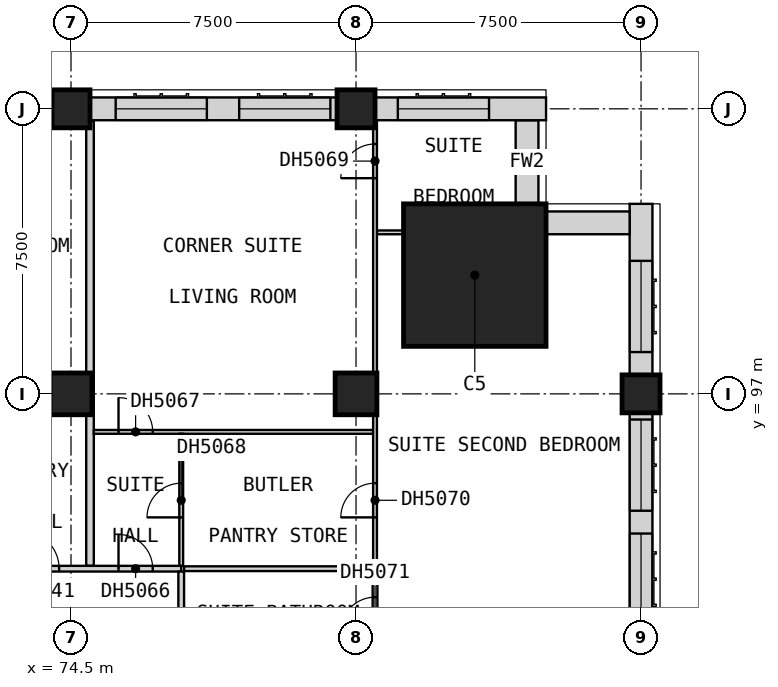
"""IFC4 building model, lengths in metres.
Left out: names, types, materials, properties, quantities, classifications, styles, units other than length and angle.
Written with IfcOpenShell. Run it as: python <this file> out.ifc"""

import sys

from ifc_helpers import new_model, si_unit, direction, frame, frame_2d, origin, origin_2d, place, context, subcontext, project, spatial, rectangle, extrude, element, fill, save


model = new_model("IFC4")
c1 = context("Model", 3, precision=1e-05, world=origin(), true_north=direction((0.0, 1.0)))
c2 = subcontext(c1, "Body", "Model", "MODEL_VIEW")
j1 = project(units=[si_unit("LENGTHUNIT", "METRE"), si_unit("PLANEANGLEUNIT", "RADIAN")], contexts=[c1])
p1 = place(None, origin())
s1 = spatial("IfcSite", under=j1, at=p1, CompositionType="ELEMENT")
p2 = place(p1, origin())
s2 = spatial("IfcBuilding", under=s1, at=p2, CompositionType="ELEMENT")
p3 = place(p2, frame((0.0, 0.0, 93.5)))
s3 = spatial("IfcBuildingStorey", under=s2, at=p3, CompositionType="ELEMENT", Elevation=93.5)
p4 = place(p3, frame((74.5, 97.0, 0.0), z_axis=(0.0, 0.0, 1.0), x_axis=(1.0, 0.0, 0.0)))
e1 = element("IfcColumn", 1, at=p4, inside=s3, PredefinedType="COLUMN", context=c2, shape_type="SweptSolid", body=[
    extrude(rectangle(XDim=1.1, YDim=1.1, at=origin_2d()), origin(), (0.0, 0.0, 1.0), 3.6),
])
p5 = place(p3, frame((74.5, 104.5, 0.0), z_axis=(0.0, 0.0, 1.0), x_axis=(1.0, 0.0, 0.0)))
e2 = element("IfcColumn", 2, at=p5, inside=s3, PredefinedType="COLUMN", context=c2, shape_type="SweptSolid", body=[
    extrude(rectangle(XDim=1.0, YDim=1.0, at=origin_2d()), origin(), (0.0, 0.0, 1.0), 3.6),
])
p6 = place(p3, frame((82.0, 97.0, 0.0), z_axis=(0.0, 0.0, 1.0), x_axis=(1.0, 0.0, 0.0)))
e3 = element("IfcColumn", 3, at=p6, inside=s3, PredefinedType="COLUMN", context=c2, shape_type="SweptSolid", body=[
    extrude(rectangle(XDim=1.1, YDim=1.1, at=origin_2d()), origin(), (0.0, 0.0, 1.0), 3.6),
])
for number, where, z_axis, x_axis in (
    (4, (82.0, 104.5, 0.0), (0.0, 0.0, 1.0), (1.0, 0.0, 0.0)),
    (5, (89.5, 97.0, 0.0), (0.0, 0.0, 1.0), (1.0, 0.0, 0.0)),
):
    element("IfcColumn", number, at=place(p3, frame(where, z_axis=z_axis, x_axis=x_axis)), inside=s3, PredefinedType="COLUMN", context=c2, shape_type="SweptSolid", body=[
        extrude(rectangle(XDim=1.0, YDim=1.0, at=origin_2d()), origin(), (0.0, 0.0, 1.0), 3.6),
    ])
p7 = place(p3, frame((85.125, 100.125, 0.0), z_axis=(0.0, 0.0, 1.0), x_axis=(1.0, 0.0, 0.0)))
e6 = element("IfcColumn", 6, at=p7, inside=s3, PredefinedType="COLUMN", context=c2, shape_type="SweptSolid", body=[
    extrude(rectangle(XDim=3.75, YDim=3.75, at=origin_2d()), origin(), (0.0, 0.0, 1.0), 3.6),
])
p8 = place(p3, frame((89.5, 90.5, 0.0), z_axis=(0.0, 0.0, 1.0), x_axis=(0.0, 1.0, 0.0)))
e7 = element("IfcWall", 7, at=p8, inside=s3, PredefinedType="SOLIDWALL", context=c2, shape_type="SweptSolid", body=[
    extrude(rectangle(XDim=6.0, YDim=0.6, at=frame_2d((3.0, 0.0))), origin(), (0.0, 0.0, 1.0), 2.85),
])
p9 = place(p8, frame((0.425, 0.0, 0.8)))
e8 = element("IfcOpeningElement", 8, at=p9, cuts=e7, PredefinedType="OPENING", context=c2, shape_type="SweptSolid", body=[
    extrude(rectangle(XDim=2.4, YDim=1.8, at=frame_2d((1.2, 0.9))), frame((0.0, 0.31, 0.0), z_axis=(0.0, -1.0, 0.0), x_axis=(1.0, 0.0, 0.0)), (0.0, 0.0, 1.0), 0.62),
])
p10 = place(p8, frame((3.425, 0.0, 0.8)))
e9 = element("IfcOpeningElement", 9, at=p10, cuts=e7, PredefinedType="OPENING", context=c2, shape_type="SweptSolid", body=[
    extrude(rectangle(XDim=2.4, YDim=1.8, at=frame_2d((1.2, 0.9))), frame((0.0, 0.31, 0.0), z_axis=(0.0, -1.0, 0.0), x_axis=(1.0, 0.0, 0.0)), (0.0, 0.0, 1.0), 0.62),
])
p11 = place(p3, frame((89.5, 97.5, 0.0), z_axis=(0.0, 0.0, 1.0), x_axis=(0.0, 1.0, 0.0)))
e10 = element("IfcWall", 10, at=p11, inside=s3, PredefinedType="SOLIDWALL", context=c2, shape_type="SweptSolid", body=[
    extrude(rectangle(XDim=4.5, YDim=0.6, at=frame_2d((2.25, 0.0))), origin(), (0.0, 0.0, 1.0), 2.85),
])
p12 = place(p11, frame((0.6, 0.0, 0.8)))
e11 = element("IfcOpeningElement", 11, at=p12, cuts=e10, PredefinedType="OPENING", context=c2, shape_type="SweptSolid", body=[
    extrude(rectangle(XDim=2.4, YDim=1.8, at=frame_2d((1.2, 0.9))), frame((0.0, 0.31, 0.0), z_axis=(0.0, -1.0, 0.0), x_axis=(1.0, 0.0, 0.0)), (0.0, 0.0, 1.0), 0.62),
])
for number, where, z_axis, x_axis in (
    (12, (89.2, 101.5, 0.0), (0.0, 0.0, 1.0), (-1.0, 0.0, 0.0)),
    (13, (86.5, 102.0, 0.0), (0.0, 0.0, 1.0), (0.0, 1.0, 0.0)),
):
    element("IfcWall", number, at=place(p3, frame(where, z_axis=z_axis, x_axis=x_axis)), inside=s3, PredefinedType="SOLIDWALL", context=c2, shape_type="SweptSolid", body=[
        extrude(rectangle(XDim=2.2, YDim=0.6, at=frame_2d((1.1, 0.0))), origin(), (0.0, 0.0, 1.0), 3.35),
    ])
p13 = place(p3, frame((87.0, 104.5, 0.0), z_axis=(0.0, 0.0, 1.0), x_axis=(-1.0, 0.0, 0.0)))
e14 = element("IfcWall", 14, at=p13, inside=s3, PredefinedType="SOLIDWALL", context=c2, shape_type="SweptSolid", body=[
    extrude(rectangle(XDim=4.5, YDim=0.6, at=frame_2d((2.25, 0.0))), origin(), (0.0, 0.0, 1.0), 2.85),
])
p14 = place(p13, frame((1.5, 0.0, 0.8)))
e15 = element("IfcOpeningElement", 15, at=p14, cuts=e14, PredefinedType="OPENING", context=c2, shape_type="SweptSolid", body=[
    extrude(rectangle(XDim=2.4, YDim=1.8, at=frame_2d((1.2, 0.9))), frame((0.0, 0.31, 0.0), z_axis=(0.0, -1.0, 0.0), x_axis=(1.0, 0.0, 0.0)), (0.0, 0.0, 1.0), 0.62),
])
p15 = place(p3, frame((81.5, 104.5, 0.0), z_axis=(0.0, 0.0, 1.0), x_axis=(-1.0, 0.0, 0.0)))
e16 = element("IfcWall", 16, at=p15, inside=s3, PredefinedType="SOLIDWALL", context=c2, shape_type="SweptSolid", body=[
    extrude(rectangle(XDim=6.5, YDim=0.6, at=frame_2d((3.25, 0.0))), origin(), (0.0, 0.0, 1.0), 2.85),
])
p16 = place(p15, frame((3.425, 0.0, 0.8)))
e17 = element("IfcOpeningElement", 17, at=p16, cuts=e16, PredefinedType="OPENING", context=c2, shape_type="SweptSolid", body=[
    extrude(rectangle(XDim=2.4, YDim=1.8, at=frame_2d((1.2, 0.9))), frame((0.0, 0.31, 0.0), z_axis=(0.0, -1.0, 0.0), x_axis=(1.0, 0.0, 0.0)), (0.0, 0.0, 1.0), 0.62),
])
p17 = place(p15, frame((0.175, 0.0, 0.8)))
e18 = element("IfcOpeningElement", 18, at=p17, cuts=e16, PredefinedType="OPENING", context=c2, shape_type="SweptSolid", body=[
    extrude(rectangle(XDim=2.4, YDim=1.8, at=frame_2d((1.2, 0.9))), frame((0.0, 0.31, 0.0), z_axis=(0.0, -1.0, 0.0), x_axis=(1.0, 0.0, 0.0)), (0.0, 0.0, 1.0), 0.62),
])
p18 = place(p3, frame((75.0, 92.475, 0.0), z_axis=(0.0, 0.0, 1.0), x_axis=(0.0, 1.0, 0.0)))
e19 = element("IfcWall", 19, at=p18, inside=s3, PredefinedType="PARTITIONING", context=c2, shape_type="SweptSolid", body=[
    extrude(rectangle(XDim=11.715, YDim=0.2, at=frame_2d((5.857, 0.0))), origin(), (0.0, 0.0, 1.0), 3.35),
])
p19 = place(p3, frame((33.75, 92.4, 0.0), z_axis=(0.0, 0.0, 1.0), x_axis=(1.0, 0.0, 0.0)))
e20 = element("IfcWall", 20, at=p19, inside=s3, PredefinedType="PARTITIONING", context=c2, shape_type="SweptSolid", body=[
    extrude(rectangle(XDim=43.65, YDim=0.15, at=frame_2d((21.825, 0.0))), origin(), (0.0, 0.0, 1.0), 3.35),
])
p20 = place(p19, frame((5.175, 0.0, 0.0)))
e21 = element("IfcOpeningElement", 21, at=p20, cuts=e20, PredefinedType="OPENING", context=c2, shape_type="SweptSolid", body=[
    extrude(rectangle(XDim=0.9, YDim=2.1, at=frame_2d((0.45, 1.05))), frame((0.0, 0.085, 0.0), z_axis=(0.0, -1.0, 0.0), x_axis=(1.0, 0.0, 0.0)), (0.0, 0.0, 1.0), 0.17),
])
p21 = place(p19, frame((13.05, 0.0, 0.0)))
e22 = element("IfcOpeningElement", 22, at=p21, cuts=e20, PredefinedType="OPENING", context=c2, shape_type="SweptSolid", body=[
    extrude(rectangle(XDim=0.9, YDim=2.1, at=frame_2d((0.45, 1.05))), frame((0.0, 0.085, 0.0), z_axis=(0.0, -1.0, 0.0), x_axis=(1.0, 0.0, 0.0)), (0.0, 0.0, 1.0), 0.17),
])
p22 = place(p19, frame((17.363, 0.0, 0.0)))
e23 = element("IfcOpeningElement", 23, at=p22, cuts=e20, PredefinedType="OPENING", context=c2, shape_type="SweptSolid", body=[
    extrude(rectangle(XDim=0.9, YDim=2.1, at=frame_2d((0.45, 1.05))), frame((0.0, 0.085, 0.0), z_axis=(0.0, -1.0, 0.0), x_axis=(1.0, 0.0, 0.0)), (0.0, 0.0, 1.0), 0.17),
])
p23 = place(p19, frame((24.3, 0.0, 0.0)))
e24 = element("IfcOpeningElement", 24, at=p23, cuts=e20, PredefinedType="OPENING", context=c2, shape_type="SweptSolid", body=[
    extrude(rectangle(XDim=0.9, YDim=2.1, at=frame_2d((0.45, 1.05))), frame((0.0, 0.085, 0.0), z_axis=(0.0, -1.0, 0.0), x_axis=(1.0, 0.0, 0.0)), (0.0, 0.0, 1.0), 0.17),
])
p24 = place(p19, frame((28.613, 0.0, 0.0)))
e25 = element("IfcOpeningElement", 25, at=p24, cuts=e20, PredefinedType="OPENING", context=c2, shape_type="SweptSolid", body=[
    extrude(rectangle(XDim=0.9, YDim=2.1, at=frame_2d((0.45, 1.05))), frame((0.0, 0.085, 0.0), z_axis=(0.0, -1.0, 0.0), x_axis=(1.0, 0.0, 0.0)), (0.0, 0.0, 1.0), 0.17),
])
p25 = place(p19, frame((32.363, 0.0, 0.0)))
e26 = element("IfcOpeningElement", 26, at=p25, cuts=e20, PredefinedType="OPENING", context=c2, shape_type="SweptSolid", body=[
    extrude(rectangle(XDim=0.9, YDim=2.1, at=frame_2d((0.45, 1.05))), frame((0.0, 0.085, 0.0), z_axis=(0.0, -1.0, 0.0), x_axis=(1.0, 0.0, 0.0)), (0.0, 0.0, 1.0), 0.17),
])
p26 = place(p19, frame((39.438, 0.0, 0.0)))
e27 = element("IfcOpeningElement", 27, at=p26, cuts=e20, PredefinedType="OPENING", context=c2, shape_type="SweptSolid", body=[
    extrude(rectangle(XDim=1.0, YDim=2.1, at=frame_2d((0.5, 1.05))), frame((0.0, 0.085, 0.0), z_axis=(0.0, -1.0, 0.0), x_axis=(1.0, 0.0, 0.0)), (0.0, 0.0, 1.0), 0.17),
])
p27 = place(p19, frame((42.0, 0.0, 0.0)))
e28 = element("IfcOpeningElement", 28, at=p27, cuts=e20, PredefinedType="OPENING", context=c2, shape_type="SweptSolid", body=[
    extrude(rectangle(XDim=0.9, YDim=2.1, at=frame_2d((0.45, 1.05))), frame((0.0, 0.085, 0.0), z_axis=(0.0, -1.0, 0.0), x_axis=(1.0, 0.0, 0.0)), (0.0, 0.0, 1.0), 0.17),
])
p28 = place(p3, frame((77.4, 50.175, 0.0), z_axis=(0.0, 0.0, 1.0), x_axis=(0.0, 1.0, 0.0)))
e29 = element("IfcWall", 29, at=p28, inside=s3, PredefinedType="PARTITIONING", context=c2, shape_type="SweptSolid", body=[
    extrude(rectangle(XDim=42.15, YDim=0.15, at=frame_2d((21.075, 0.0))), origin(), (0.0, 0.0, 1.0), 3.35),
])
p29 = place(p28, frame((4.125, 0.0, 0.0)))
e30 = element("IfcOpeningElement", 30, at=p29, cuts=e29, PredefinedType="OPENING", context=c2, shape_type="SweptSolid", body=[
    extrude(rectangle(XDim=0.9, YDim=2.1, at=frame_2d((0.45, 1.05))), frame((0.0, 0.085, 0.0), z_axis=(0.0, -1.0, 0.0), x_axis=(1.0, 0.0, 0.0)), (0.0, 0.0, 1.0), 0.17),
])
p30 = place(p28, frame((19.125, 0.0, 0.0)))
e31 = element("IfcOpeningElement", 31, at=p30, cuts=e29, PredefinedType="OPENING", context=c2, shape_type="SweptSolid", body=[
    extrude(rectangle(XDim=0.9, YDim=2.1, at=frame_2d((0.45, 1.05))), frame((0.0, 0.085, 0.0), z_axis=(0.0, -1.0, 0.0), x_axis=(1.0, 0.0, 0.0)), (0.0, 0.0, 1.0), 0.17),
])
p31 = place(p28, frame((26.625, 0.0, 0.0)))
e32 = element("IfcOpeningElement", 32, at=p31, cuts=e29, PredefinedType="OPENING", context=c2, shape_type="SweptSolid", body=[
    extrude(rectangle(XDim=0.9, YDim=2.1, at=frame_2d((0.45, 1.05))), frame((0.0, 0.085, 0.0), z_axis=(0.0, -1.0, 0.0), x_axis=(1.0, 0.0, 0.0)), (0.0, 0.0, 1.0), 0.17),
])
p32 = place(p28, frame((30.938, 0.0, 0.0)))
e33 = element("IfcOpeningElement", 33, at=p32, cuts=e29, PredefinedType="OPENING", context=c2, shape_type="SweptSolid", body=[
    extrude(rectangle(XDim=0.9, YDim=2.1, at=frame_2d((0.45, 1.05))), frame((0.0, 0.085, 0.0), z_axis=(0.0, -1.0, 0.0), x_axis=(1.0, 0.0, 0.0)), (0.0, 0.0, 1.0), 0.17),
])
p33 = place(p28, frame((38.012, 0.0, 0.0)))
e34 = element("IfcOpeningElement", 34, at=p33, cuts=e29, PredefinedType="OPENING", context=c2, shape_type="SweptSolid", body=[
    extrude(rectangle(XDim=1.0, YDim=2.1, at=frame_2d((0.5, 1.05))), frame((0.0, 0.085, 0.0), z_axis=(0.0, -1.0, 0.0), x_axis=(1.0, 0.0, 0.0)), (0.0, 0.0, 1.0), 0.17),
])
p34 = place(p3, frame((75.1, 96.0, 0.0), z_axis=(0.0, 0.0, 1.0), x_axis=(1.0, 0.0, 0.0)))
e35 = element("IfcWall", 35, at=p34, inside=s3, PredefinedType="PARTITIONING", context=c2, shape_type="SweptSolid", body=[
    extrude(rectangle(XDim=7.35, YDim=0.1, at=frame_2d((3.675, 0.0))), origin(), (0.0, 0.0, 1.0), 3.35),
])
p35 = place(p34, frame((0.65, 0.0, 0.0)))
e36 = element("IfcOpeningElement", 36, at=p35, cuts=e35, PredefinedType="OPENING", context=c2, shape_type="SweptSolid", body=[
    extrude(rectangle(XDim=0.9, YDim=2.1, at=frame_2d((0.45, 1.05))), frame((0.0, 0.06, 0.0), z_axis=(0.0, -1.0, 0.0), x_axis=(1.0, 0.0, 0.0)), (0.0, 0.0, 1.0), 0.12),
])
p36 = place(p3, frame((72.438, 96.75, 0.0), z_axis=(0.0, 0.0, 1.0), x_axis=(1.0, 0.0, 0.0)))
e37 = element("IfcWall", 37, at=p36, inside=s3, PredefinedType="PARTITIONING", context=c2, shape_type="SweptSolid", body=[
    extrude(rectangle(XDim=2.462, YDim=0.1, at=frame_2d((1.231, 0.0))), origin(), (0.0, 0.0, 1.0), 3.35),
])
p37 = place(p36, frame((0.4, 0.0, 0.0)))
e38 = element("IfcOpeningElement", 38, at=p37, cuts=e37, PredefinedType="OPENING", context=c2, shape_type="SweptSolid", body=[
    extrude(rectangle(XDim=1.0, YDim=2.1, at=frame_2d((0.5, 1.05))), frame((0.0, 0.06, 0.0), z_axis=(0.0, -1.0, 0.0), x_axis=(1.0, 0.0, 0.0)), (0.0, 0.0, 1.0), 0.12),
])
p38 = place(p3, frame((82.55, 101.25, 0.0), z_axis=(0.0, 0.0, 1.0), x_axis=(1.0, 0.0, 0.0)))
e39 = element("IfcWall", 39, at=p38, inside=s3, PredefinedType="PARTITIONING", context=c2, shape_type="SweptSolid", body=[
    extrude(rectangle(XDim=4.44, YDim=0.1, at=frame_2d((2.22, 0.0))), origin(), (0.0, 0.0, 1.0), 3.35),
])
p39 = place(p3, frame((77.4, 92.475, 0.0), z_axis=(0.0, 0.0, 1.0), x_axis=(0.0, 1.0, 0.0)))
e40 = element("IfcWall", 40, at=p39, inside=s3, PredefinedType="PARTITIONING", context=c2, shape_type="SweptSolid", body=[
    extrude(rectangle(XDim=3.475, YDim=0.1, at=frame_2d((1.737, 0.0))), origin(), (0.0, 0.0, 1.0), 3.35),
])
p40 = place(p39, frame((1.275, 0.0, 0.0)))
e41 = element("IfcOpeningElement", 41, at=p40, cuts=e40, PredefinedType="OPENING", context=c2, shape_type="SweptSolid", body=[
    extrude(rectangle(XDim=0.9, YDim=2.1, at=frame_2d((0.45, 1.05))), frame((0.0, 0.06, 0.0), z_axis=(0.0, -1.0, 0.0), x_axis=(1.0, 0.0, 0.0)), (0.0, 0.0, 1.0), 0.12),
])
p41 = place(p3, frame((82.5, 92.462, 0.0), z_axis=(0.0, 0.0, 1.0), x_axis=(0.0, 1.0, 0.0)))
e42 = element("IfcWall", 42, at=p41, inside=s3, PredefinedType="PARTITIONING", context=c2, shape_type="SweptSolid", body=[
    extrude(rectangle(XDim=11.728, YDim=0.1, at=frame_2d((5.864, 0.0))), origin(), (0.0, 0.0, 1.0), 3.35),
])
p42 = place(p41, frame((10.212, 0.0, 0.0)))
e43 = element("IfcOpeningElement", 43, at=p42, cuts=e42, PredefinedType="OPENING", context=c2, shape_type="SweptSolid", body=[
    extrude(rectangle(XDim=0.9, YDim=2.1, at=frame_2d((0.45, 1.05))), frame((0.0, 0.06, 0.0), z_axis=(0.0, -1.0, 0.0), x_axis=(1.0, 0.0, 0.0)), (0.0, 0.0, 1.0), 0.12),
])
p43 = place(p41, frame((1.288, 0.0, 0.0)))
e44 = element("IfcOpeningElement", 44, at=p43, cuts=e42, PredefinedType="OPENING", context=c2, shape_type="SweptSolid", body=[
    extrude(rectangle(XDim=0.9, YDim=2.1, at=frame_2d((0.45, 1.05))), frame((0.0, 0.06, 0.0), z_axis=(0.0, -1.0, 0.0), x_axis=(1.0, 0.0, 0.0)), (0.0, 0.0, 1.0), 0.12),
])
p44 = place(p3, frame((77.475, 92.4, 0.0), z_axis=(0.0, 0.0, 1.0), x_axis=(1.0, 0.0, 0.0)))
e45 = element("IfcWall", 45, at=p44, inside=s3, PredefinedType="PARTITIONING", context=c2, shape_type="SweptSolid", body=[
    extrude(rectangle(XDim=5.025, YDim=0.125, at=frame_2d((2.512, 0.0))), origin(), (0.0, 0.0, 1.0), 3.35),
])
p45 = place(p3, frame((82.5, 90.1, 0.0), z_axis=(0.0, 0.0, 1.0), x_axis=(0.0, 1.0, 0.0)))
e46 = element("IfcWall", 46, at=p45, inside=s3, PredefinedType="PARTITIONING", context=c2, shape_type="SweptSolid", body=[
    extrude(rectangle(XDim=2.237, YDim=0.125, at=frame_2d((1.119, 0.0))), origin(), (0.0, 0.0, 1.0), 3.35),
])
p46 = place(p45, frame((0.65, 0.0, 0.0)))
e47 = element("IfcOpeningElement", 47, at=p46, cuts=e46, PredefinedType="OPENING", context=c2, shape_type="SweptSolid", body=[
    extrude(rectangle(XDim=0.9, YDim=2.1, at=frame_2d((0.45, 1.05))), frame((0.0, 0.073, 0.0), z_axis=(0.0, -1.0, 0.0), x_axis=(1.0, 0.0, 0.0)), (0.0, 0.0, 1.0), 0.145),
])
p47 = place(p9, origin())
e48 = element("IfcWindow", 48, at=p47, inside=s3, PartitioningType="SINGLE_PANEL", PredefinedType="WINDOW", context=c2, shape_type="SweptSolid", body=[
    extrude(rectangle(XDim=2.4, YDim=1.8, at=frame_2d((1.2, 0.9))), frame((0.0, -0.07, 0.0), z_axis=(0.0, -1.0, 0.0), x_axis=(1.0, 0.0, 0.0)), (0.0, 0.0, 1.0), 0.06),
])
fill(e8, e48)
p48 = place(p10, origin())
e49 = element("IfcWindow", 49, at=p48, inside=s3, PartitioningType="SINGLE_PANEL", PredefinedType="WINDOW", context=c2, shape_type="SweptSolid", body=[
    extrude(rectangle(XDim=2.4, YDim=1.8, at=frame_2d((1.2, 0.9))), frame((0.0, -0.07, 0.0), z_axis=(0.0, -1.0, 0.0), x_axis=(1.0, 0.0, 0.0)), (0.0, 0.0, 1.0), 0.06),
])
fill(e9, e49)
p49 = place(p12, origin())
e50 = element("IfcWindow", 50, at=p49, inside=s3, PartitioningType="SINGLE_PANEL", PredefinedType="WINDOW", context=c2, shape_type="SweptSolid", body=[
    extrude(rectangle(XDim=2.4, YDim=1.8, at=frame_2d((1.2, 0.9))), frame((0.0, -0.07, 0.0), z_axis=(0.0, -1.0, 0.0), x_axis=(1.0, 0.0, 0.0)), (0.0, 0.0, 1.0), 0.06),
])
fill(e11, e50)
p50 = place(p14, origin())
e51 = element("IfcWindow", 51, at=p50, inside=s3, PartitioningType="SINGLE_PANEL", PredefinedType="WINDOW", context=c2, shape_type="SweptSolid", body=[
    extrude(rectangle(XDim=2.4, YDim=1.8, at=frame_2d((1.2, 0.9))), frame((0.0, -0.07, 0.0), z_axis=(0.0, -1.0, 0.0), x_axis=(1.0, 0.0, 0.0)), (0.0, 0.0, 1.0), 0.06),
])
fill(e15, e51)
p51 = place(p16, origin())
e52 = element("IfcWindow", 52, at=p51, inside=s3, PartitioningType="SINGLE_PANEL", PredefinedType="WINDOW", context=c2, shape_type="SweptSolid", body=[
    extrude(rectangle(XDim=2.4, YDim=1.8, at=frame_2d((1.2, 0.9))), frame((0.0, -0.07, 0.0), z_axis=(0.0, -1.0, 0.0), x_axis=(1.0, 0.0, 0.0)), (0.0, 0.0, 1.0), 0.06),
])
fill(e17, e52)
p52 = place(p17, origin())
e53 = element("IfcWindow", 53, at=p52, inside=s3, PartitioningType="SINGLE_PANEL", PredefinedType="WINDOW", context=c2, shape_type="SweptSolid", body=[
    extrude(rectangle(XDim=2.4, YDim=1.8, at=frame_2d((1.2, 0.9))), frame((0.0, -0.07, 0.0), z_axis=(0.0, -1.0, 0.0), x_axis=(1.0, 0.0, 0.0)), (0.0, 0.0, 1.0), 0.06),
])
fill(e18, e53)
p53 = place(p26, origin())
e54 = element("IfcDoor", 54, at=p53, inside=s3, OperationType="SINGLE_SWING_LEFT", PredefinedType="DOOR", context=c2, shape_type="SweptSolid", body=[
    extrude(rectangle(XDim=1.0, YDim=2.1, at=frame_2d((0.5, 1.05))), frame((0.0, 0.025, 0.0), z_axis=(0.0, -1.0, 0.0), x_axis=(1.0, 0.0, 0.0)), (0.0, 0.0, 1.0), 0.05),
])
fill(e27, e54)
p54 = place(p27, origin())
e55 = element("IfcDoor", 55, at=p54, inside=s3, OperationType="SINGLE_SWING_RIGHT", PredefinedType="DOOR", context=c2, shape_type="SweptSolid", body=[
    extrude(rectangle(XDim=0.9, YDim=2.1, at=frame_2d((0.45, 1.05))), frame((0.0, 0.025, 0.0), z_axis=(0.0, -1.0, 0.0), x_axis=(1.0, 0.0, 0.0)), (0.0, 0.0, 1.0), 0.05),
])
fill(e28, e55)
p55 = place(p35, origin())
e56 = element("IfcDoor", 56, at=p55, inside=s3, OperationType="SINGLE_SWING_LEFT", PredefinedType="DOOR", context=c2, shape_type="SweptSolid", body=[
    extrude(rectangle(XDim=0.9, YDim=2.1, at=frame_2d((0.45, 1.05))), frame((0.0, 0.025, 0.0), z_axis=(0.0, -1.0, 0.0), x_axis=(1.0, 0.0, 0.0)), (0.0, 0.0, 1.0), 0.05),
])
fill(e36, e56)
p56 = place(p40, origin())
e57 = element("IfcDoor", 57, at=p56, inside=s3, OperationType="SINGLE_SWING_RIGHT", PredefinedType="DOOR", context=c2, shape_type="SweptSolid", body=[
    extrude(rectangle(XDim=0.9, YDim=2.1, at=frame_2d((0.45, 1.05))), frame((0.0, 0.025, 0.0), z_axis=(0.0, -1.0, 0.0), x_axis=(1.0, 0.0, 0.0)), (0.0, 0.0, 1.0), 0.05),
])
fill(e41, e57)
p57 = place(p42, origin())
e58 = element("IfcDoor", 58, at=p57, inside=s3, OperationType="SINGLE_SWING_LEFT", PredefinedType="DOOR", context=c2, shape_type="SweptSolid", body=[
    extrude(rectangle(XDim=0.9, YDim=2.1, at=frame_2d((0.45, 1.05))), frame((0.0, 0.025, 0.0), z_axis=(0.0, -1.0, 0.0), x_axis=(1.0, 0.0, 0.0)), (0.0, 0.0, 1.0), 0.05),
])
fill(e43, e58)
p58 = place(p43, origin())
e59 = element("IfcDoor", 59, at=p58, inside=s3, OperationType="SINGLE_SWING_RIGHT", PredefinedType="DOOR", context=c2, shape_type="SweptSolid", body=[
    extrude(rectangle(XDim=0.9, YDim=2.1, at=frame_2d((0.45, 1.05))), frame((0.0, 0.025, 0.0), z_axis=(0.0, -1.0, 0.0), x_axis=(1.0, 0.0, 0.0)), (0.0, 0.0, 1.0), 0.05),
])
fill(e44, e59)
p59 = place(p46, origin())
e60 = element("IfcDoor", 60, at=p59, inside=s3, OperationType="SINGLE_SWING_LEFT", PredefinedType="DOOR", context=c2, shape_type="SweptSolid", body=[
    extrude(rectangle(XDim=0.9, YDim=2.1, at=frame_2d((0.45, 1.05))), frame((0.0, 0.025, 0.0), z_axis=(0.0, -1.0, 0.0), x_axis=(1.0, 0.0, 0.0)), (0.0, 0.0, 1.0), 0.05),
])
fill(e47, e60)
save(model, sys.argv[1])
